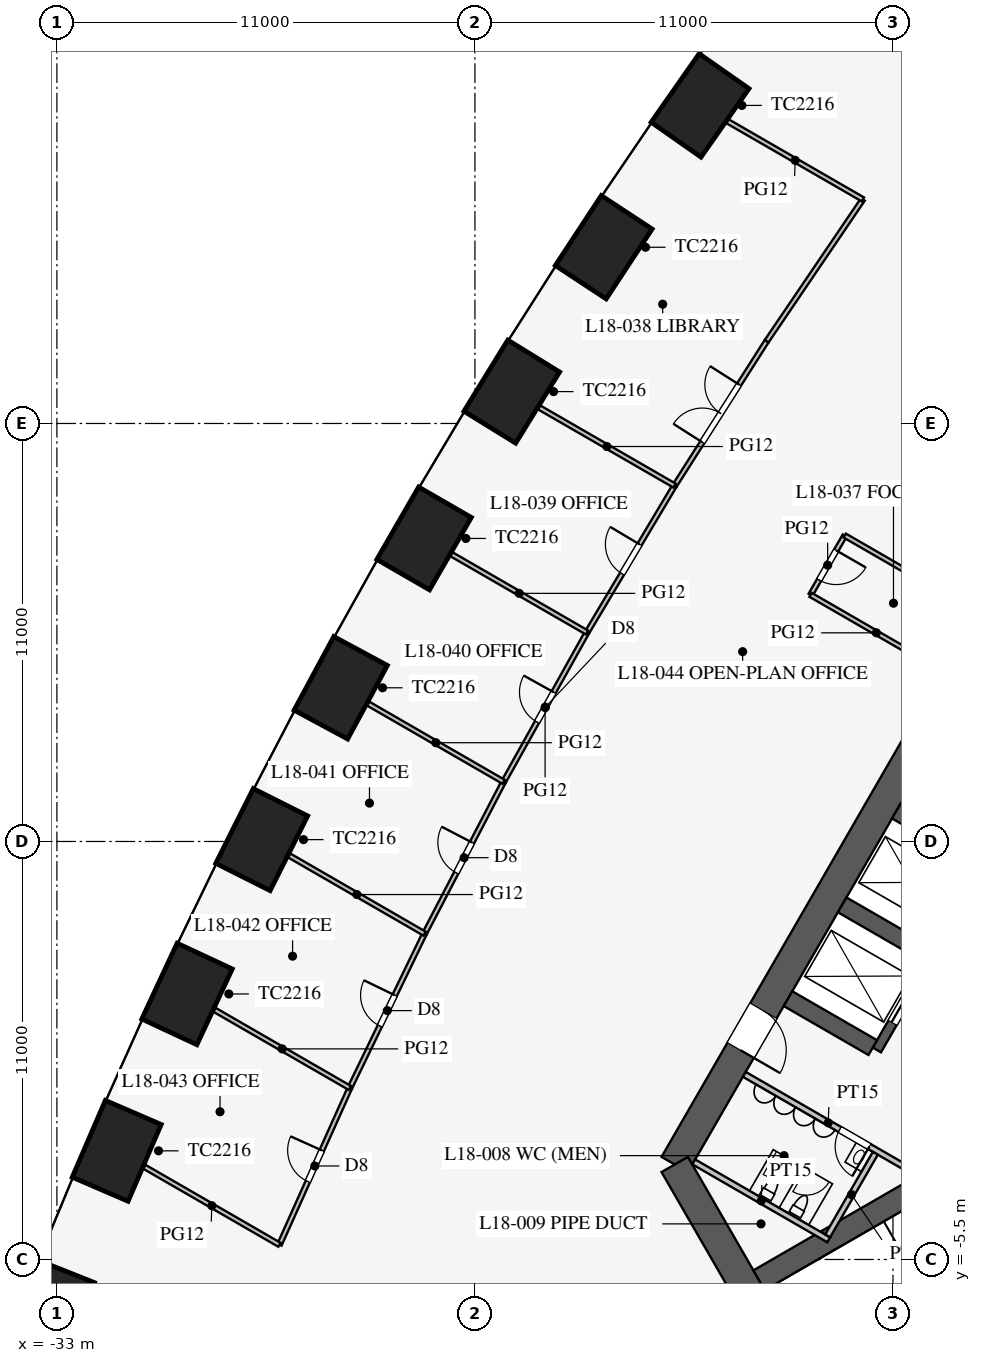
"""IFC4 building model, lengths in metres.
Left out: names, types, materials, properties, quantities, classifications, styles, units other than length and angle.
Written with IfcOpenShell. Run it as: python <this file> out.ifc"""

import sys

from ifc_helpers import new_model, si_unit, direction, frame, frame_2d, origin, origin_2d, place, context, subcontext, project, spatial, rectangle, extrude, element, fill, save


model = new_model("IFC4")
c1 = context("Model", 3, precision=1e-05, world=origin(), true_north=direction((0.0, 1.0)))
c2 = subcontext(c1, "Body", "Model", "MODEL_VIEW")
j1 = project(units=[si_unit("LENGTHUNIT", "METRE"), si_unit("PLANEANGLEUNIT", "RADIAN")], contexts=[c1])
p1 = place(None, origin())
s1 = spatial("IfcSite", under=j1, at=p1, CompositionType="ELEMENT")
p2 = place(p1, origin())
s2 = spatial("IfcBuilding", under=s1, at=p2, CompositionType="ELEMENT")
p3 = place(p2, frame((0.0, 0.0, 79.5)))
s3 = spatial("IfcBuildingStorey", under=s2, at=p3, CompositionType="ELEMENT", Elevation=79.5)
for number, where, z_axis, x_axis in (
    (1, (-16.076, 24.87, 0.0), (0.0, 0.0, 1.0), (-0.574, -0.819, 0.0)),
    (2, (-18.611, 21.137, 0.0), (0.0, 0.0, 1.0), (-0.549, -0.836, 0.0)),
    (3, (-21.031, 17.339, 0.0), (0.0, 0.0, 1.0), (-0.525, -0.851, 0.0)),
    (4, (-23.338, 13.474, 0.0), (0.0, 0.0, 1.0), (-0.5, -0.866, 0.0)),
    (5, (-25.531, 9.544, 0.0), (0.0, 0.0, 1.0), (-0.475, -0.88, 0.0)),
    (6, (-27.611, 5.549, 0.0), (0.0, 0.0, 1.0), (-0.449, -0.894, 0.0)),
    (7, (-29.576, 1.487, 0.0), (0.0, 0.0, 1.0), (-0.423, -0.906, 0.0)),
    (8, (-31.426, -2.641, 0.0), (0.0, 0.0, 1.0), (-0.396, -0.918, 0.0)),
    (9, (-33.16, -6.836, 0.0), (0.0, 0.0, 1.0), (-0.369, -0.929, 0.0)),
):
    element("IfcColumn", number, at=place(p3, frame(where, z_axis=z_axis, x_axis=x_axis)), inside=s3, PredefinedType="COLUMN", context=c2, shape_type="SweptSolid", body=[
        extrude(rectangle(XDim=2.2, YDim=1.6, at=origin_2d()), origin(), (0.0, 0.0, 1.0), 4.2),
    ])
p4 = place(p3, frame((-5.773, 16.0, 0.0), z_axis=(0.0, 0.0, 1.0), x_axis=(-0.500002442456, -0.866023993627, 0.0)))
e10 = element("IfcWall", 10, at=p4, inside=s3, PredefinedType="SHEAR", context=c2, shape_type="SweptSolid", body=[
    extrude(rectangle(XDim=21.939, YDim=0.8, at=frame_2d((10.97, 0.0))), origin(), (0.0, 0.0, 1.0), 4.2),
])
p5 = place(p4, frame((17.27, 0.0, 0.0)))
e11 = element("IfcOpeningElement", 11, at=p5, cuts=e10, PredefinedType="OPENING", context=c2, shape_type="SweptSolid", body=[
    extrude(rectangle(XDim=1.2, YDim=2.1, at=frame_2d((0.6, 1.05))), frame((0.0, 0.41, 0.0), z_axis=(0.0, -1.0, 0.0), x_axis=(1.0, 0.0, 0.0)), (0.0, 0.0, 1.0), 0.82),
])
p6 = place(p4, frame((3.47, 0.0, 0.0)))
e12 = element("IfcOpeningElement", 12, at=p6, cuts=e10, PredefinedType="OPENING", context=c2, shape_type="SweptSolid", body=[
    extrude(rectangle(XDim=1.2, YDim=2.1, at=frame_2d((0.6, 1.05))), frame((0.0, 0.41, 0.0), z_axis=(0.0, -1.0, 0.0), x_axis=(1.0, 0.0, 0.0)), (0.0, 0.0, 1.0), 0.82),
])
p7 = place(p3, frame((-16.743, -3.0, 0.0), z_axis=(0.0, 0.0, 1.0), x_axis=(0.499995765644, -0.866027848477, 0.0)))
e13 = element("IfcWall", 13, at=p7, inside=s3, PredefinedType="SHEAR", context=c2, shape_type="SweptSolid", body=[
    extrude(rectangle(XDim=11.547, YDim=0.8, at=frame_2d((5.773, 0.0))), origin(), (0.0, 0.0, 1.0), 4.2),
])
p8 = place(p3, frame((-5.724, 9.886, 0.0), z_axis=(0.0, 0.0, 1.0), x_axis=(-0.500001763848, -0.866024385424, 0.0)))
e14 = element("IfcWall", 14, at=p8, inside=s3, PredefinedType="SHEAR", context=c2, shape_type="SweptSolid", body=[
    extrude(rectangle(XDim=11.4, YDim=0.25, at=frame_2d((5.7, 0.0))), origin(), (0.0, 0.0, 1.0), 4.2),
])
p9 = place(p8, frame((6.525, 0.0, 0.0)))
e15 = element("IfcOpeningElement", 15, at=p9, cuts=e14, PredefinedType="OPENING", context=c2, shape_type="SweptSolid", body=[
    extrude(rectangle(XDim=1.2, YDim=2.2, at=frame_2d((0.6, 1.1))), frame((0.0, 0.135, 0.0), z_axis=(0.0, -1.0, 0.0), x_axis=(1.0, 0.0, 0.0)), (0.0, 0.0, 1.0), 0.27),
])
p10 = place(p8, frame((9.375, 0.0, 0.0)))
e16 = element("IfcOpeningElement", 16, at=p10, cuts=e14, PredefinedType="OPENING", context=c2, shape_type="SweptSolid", body=[
    extrude(rectangle(XDim=1.2, YDim=2.2, at=frame_2d((0.6, 1.1))), frame((0.0, 0.135, 0.0), z_axis=(0.0, -1.0, 0.0), x_axis=(1.0, 0.0, 0.0)), (0.0, 0.0, 1.0), 0.27),
])
for number, where, z_axis, x_axis in (
    (17, (-8.682, 5.012, 0.0), (0.0, 0.0, 1.0), (-0.866, 0.5, 0.0)),
    (18, (-10.107, 2.544, 0.0), (0.0, 0.0, 1.0), (-0.866, 0.5, 0.0)),
    (19, (-11.532, 0.076, 0.0), (0.0, 0.0, 1.0), (-0.866, 0.5, 0.0)),
):
    element("IfcWall", number, at=place(p3, frame(where, z_axis=z_axis, x_axis=x_axis)), inside=s3, PredefinedType="SHEAR", context=c2, shape_type="SweptSolid", body=[
        extrude(rectangle(XDim=2.575, YDim=0.45, at=frame_2d((1.288, 0.0))), origin(), (0.0, 0.0, 1.0), 4.2),
    ])
for number, where, z_axis, x_axis in (
    (20, (-6.663, -1.509, 0.0), (0.0, 0.0, 1.0), (-0.866, -0.5, 0.0)),
    (21, (-4.638, -5.016, 0.0), (0.0, 0.0, 1.0), (-0.866, -0.5, 0.0)),
):
    element("IfcWall", number, at=place(p3, frame(where, z_axis=z_axis, x_axis=x_axis)), inside=s3, PredefinedType="SHEAR", context=c2, shape_type="SweptSolid", body=[
        extrude(rectangle(XDim=9.075, YDim=0.6, at=frame_2d((4.538, 0.0))), origin(), (0.0, 0.0, 1.0), 4.2),
    ])
p11 = place(p3, frame((-10.495, -3.178, 0.0), z_axis=(0.0, 0.0, 1.0), x_axis=(-0.86602216432, 0.500005610874, 0.0)))
e22 = element("IfcWall", 22, at=p11, inside=s3, PredefinedType="PARTITIONING", context=c2, shape_type="SweptSolid", body=[
    extrude(rectangle(XDim=5.1, YDim=0.15, at=frame_2d((2.55, 0.0))), origin(), (0.0, 0.0, 1.0), 4.0),
])
p12 = place(p11, frame((1.3, 0.0, 0.0)))
e23 = element("IfcOpeningElement", 23, at=p12, cuts=e22, PredefinedType="OPENING", context=c2, shape_type="SweptSolid", body=[
    extrude(rectangle(XDim=0.9, YDim=2.1, at=frame_2d((0.45, 1.05))), frame((0.0, 0.085, 0.0), z_axis=(0.0, -1.0, 0.0), x_axis=(1.0, 0.0, 0.0)), (0.0, 0.0, 1.0), 0.17),
])
p13 = place(p3, frame((-12.691, -4.982, 0.0), z_axis=(0.0, 0.0, 1.0), x_axis=(-0.8660249478, 0.500000789788, 0.0)))
e24 = element("IfcWall", 24, at=p13, inside=s3, PredefinedType="PARTITIONING", context=c2, shape_type="SweptSolid", body=[
    extrude(rectangle(XDim=4.1, YDim=0.15, at=frame_2d((2.05, 0.0))), origin(), (0.0, 0.0, 1.0), 4.0),
])
p14 = place(p3, frame((-11.464, -2.706, 0.0), z_axis=(0.0, 0.0, 1.0), x_axis=(-0.50001992892, -0.866013897511, 0.0)))
e25 = element("IfcWall", 25, at=p14, inside=s3, PredefinedType="PARTITIONING", context=c2, shape_type="SweptSolid", body=[
    extrude(rectangle(XDim=2.51, YDim=0.15, at=frame_2d((1.255, 0.0))), origin(), (0.0, 0.0, 1.0), 4.0),
])
p15 = place(p3, frame((-12.269, 13.55, 0.0), z_axis=(0.0, 0.0, 1.0), x_axis=(-0.500062916607, -0.865989075817, 0.0)))
e26 = element("IfcWall", 26, at=p15, inside=s3, PredefinedType="PARTITIONING", context=c2, shape_type="SweptSolid", body=[
    extrude(rectangle(XDim=1.8, YDim=0.12, at=frame_2d((0.9, 0.0))), origin(), (0.0, 0.0, 1.0), 2.9),
])
p16 = place(p15, frame((0.45, 0.0, 0.15)))
e27 = element("IfcOpeningElement", 27, at=p16, cuts=e26, PredefinedType="OPENING", context=c2, shape_type="SweptSolid", body=[
    extrude(rectangle(XDim=0.9, YDim=2.1, at=frame_2d((0.45, 1.05))), frame((0.0, 0.07, 0.0), z_axis=(0.0, -1.0, 0.0), x_axis=(1.0, 0.0, 0.0)), (0.0, 0.0, 1.0), 0.14),
])
for number, where, z_axis, x_axis in (
    (28, (-9.705, 9.991, 0.0), (0.0, 0.0, 1.0), (-0.866, 0.5, 0.0)),
    (29, (-8.805, 11.55, 0.0), (0.0, 0.0, 1.0), (-0.866, 0.5, 0.0)),
):
    element("IfcWall", number, at=place(p3, frame(where, z_axis=z_axis, x_axis=x_axis)), inside=s3, PredefinedType="PARTITIONING", context=c2, shape_type="SweptSolid", body=[
        extrude(rectangle(XDim=4.0, YDim=0.12, at=frame_2d((2.0, 0.0))), origin(), (0.0, 0.0, 1.0), 2.9),
    ])
p17 = place(p3, frame((-19.052, 10.999, 0.0), z_axis=(0.0, 0.0, 1.0), x_axis=(-0.487373854787, -0.873193406795, 0.0)))
e30 = element("IfcWall", 30, at=p17, inside=s3, PredefinedType="PARTITIONING", context=c2, shape_type="SweptSolid", body=[
    extrude(rectangle(XDim=4.5, YDim=0.12, at=frame_2d((2.25, 0.0))), origin(), (0.0, 0.0, 1.0), 2.9),
])
p18 = place(p17, frame((1.8, 0.0, 0.15)))
e31 = element("IfcOpeningElement", 31, at=p18, cuts=e30, PredefinedType="OPENING", context=c2, shape_type="SweptSolid", body=[
    extrude(rectangle(XDim=0.9, YDim=2.1, at=frame_2d((0.45, 1.05))), frame((0.0, 0.07, 0.0), z_axis=(0.0, -1.0, 0.0), x_axis=(1.0, 0.0, 0.0)), (0.0, 0.0, 1.0), 0.14),
])
p19 = place(p3, frame((-25.292, -0.986, 0.0), z_axis=(0.0, 0.0, 1.0), x_axis=(-0.409451055745, -0.912332084796, 0.0)))
e32 = element("IfcWall", 32, at=p19, inside=s3, PredefinedType="PARTITIONING", context=c2, shape_type="SweptSolid", body=[
    extrude(rectangle(XDim=4.523, YDim=0.12, at=frame_2d((2.262, 0.0))), origin(), (0.0, 0.0, 1.0), 2.9),
])
p20 = place(p19, frame((1.8, 0.0, 0.15)))
e33 = element("IfcOpeningElement", 33, at=p20, cuts=e32, PredefinedType="OPENING", context=c2, shape_type="SweptSolid", body=[
    extrude(rectangle(XDim=0.9, YDim=2.1, at=frame_2d((0.45, 1.05))), frame((0.0, 0.07, 0.0), z_axis=(0.0, -1.0, 0.0), x_axis=(1.0, 0.0, 0.0)), (0.0, 0.0, 1.0), 0.14),
])
p21 = place(p3, frame((-21.245, 7.07, 0.0), z_axis=(0.0, 0.0, 1.0), x_axis=(-0.461852697957, -0.886956642339, 0.0)))
e34 = element("IfcWall", 34, at=p21, inside=s3, PredefinedType="PARTITIONING", context=c2, shape_type="SweptSolid", body=[
    extrude(rectangle(XDim=4.504, YDim=0.12, at=frame_2d((2.252, 0.0))), origin(), (0.0, 0.0, 1.0), 2.9),
])
p22 = place(p21, frame((1.8, 0.0, 0.15)))
e35 = element("IfcOpeningElement", 35, at=p22, cuts=e34, PredefinedType="OPENING", context=c2, shape_type="SweptSolid", body=[
    extrude(rectangle(XDim=0.9, YDim=2.1, at=frame_2d((0.45, 1.05))), frame((0.0, 0.07, 0.0), z_axis=(0.0, -1.0, 0.0), x_axis=(1.0, 0.0, 0.0)), (0.0, 0.0, 1.0), 0.14),
])
p23 = place(p3, frame((-23.325, 3.074, 0.0), z_axis=(0.0, 0.0, 1.0), x_axis=(-0.435857917556, -0.900015486369, 0.0)))
e36 = element("IfcWall", 36, at=p23, inside=s3, PredefinedType="PARTITIONING", context=c2, shape_type="SweptSolid", body=[
    extrude(rectangle(XDim=4.512, YDim=0.12, at=frame_2d((2.256, 0.0))), origin(), (0.0, 0.0, 1.0), 2.9),
])
p24 = place(p23, frame((1.8, 0.0, 0.15)))
e37 = element("IfcOpeningElement", 37, at=p24, cuts=e36, PredefinedType="OPENING", context=c2, shape_type="SweptSolid", body=[
    extrude(rectangle(XDim=0.9, YDim=2.1, at=frame_2d((0.45, 1.05))), frame((0.0, 0.07, 0.0), z_axis=(0.0, -1.0, 0.0), x_axis=(1.0, 0.0, 0.0)), (0.0, 0.0, 1.0), 0.14),
])
p25 = place(p3, frame((-11.792, 22.396, 0.0), z_axis=(0.0, 0.0, 1.0), x_axis=(-0.561512004239, -0.827468591002, 0.0)))
e38 = element("IfcWall", 38, at=p25, inside=s3, PredefinedType="PARTITIONING", context=c2, shape_type="SweptSolid", body=[
    extrude(rectangle(XDim=4.512, YDim=0.12, at=frame_2d((2.256, 0.0))), origin(), (0.0, 0.0, 1.0), 2.9),
])
p26 = place(p3, frame((-16.745, 14.864, 0.0), z_axis=(0.0, 0.0, 1.0), x_axis=(-0.51252396108, -0.858672923364, 0.0)))
e39 = element("IfcWall", 39, at=p26, inside=s3, PredefinedType="PARTITIONING", context=c2, shape_type="SweptSolid", body=[
    extrude(rectangle(XDim=4.5, YDim=0.12, at=frame_2d((2.25, 0.0))), origin(), (0.0, 0.0, 1.0), 2.9),
])
p27 = place(p26, frame((1.8, 0.0, 0.15)))
e40 = element("IfcOpeningElement", 40, at=p27, cuts=e39, PredefinedType="OPENING", context=c2, shape_type="SweptSolid", body=[
    extrude(rectangle(XDim=0.9, YDim=2.1, at=frame_2d((0.45, 1.05))), frame((0.0, 0.07, 0.0), z_axis=(0.0, -1.0, 0.0), x_axis=(1.0, 0.0, 0.0)), (0.0, 0.0, 1.0), 0.14),
])
p28 = place(p3, frame((-14.325, 18.663, 0.0), z_axis=(0.0, 0.0, 1.0), x_axis=(-0.537205132487, -0.843451626135, 0.0)))
e41 = element("IfcWall", 41, at=p28, inside=s3, PredefinedType="PARTITIONING", context=c2, shape_type="SweptSolid", body=[
    extrude(rectangle(XDim=4.504, YDim=0.12, at=frame_2d((2.252, 0.0))), origin(), (0.0, 0.0, 1.0), 2.9),
])
p29 = place(p28, frame((1.35, 0.0, 0.15)))
e42 = element("IfcOpeningElement", 42, at=p29, cuts=e41, PredefinedType="OPENING", context=c2, shape_type="SweptSolid", body=[
    extrude(rectangle(XDim=1.8, YDim=2.1, at=frame_2d((0.9, 1.05))), frame((0.0, 0.07, 0.0), z_axis=(0.0, -1.0, 0.0), x_axis=(1.0, 0.0, 0.0)), (0.0, 0.0, 1.0), 0.14),
])
p30 = place(p3, frame((-19.052, 10.999, 0.0), z_axis=(0.0, 0.0, 1.0), x_axis=(-0.866009926209, 0.50002680699, 0.0)))
e43 = element("IfcWall", 43, at=p30, inside=s3, PredefinedType="PARTITIONING", context=c2, shape_type="SweptSolid", body=[
    extrude(rectangle(XDim=4.12, YDim=0.12, at=frame_2d((2.06, 0.0))), origin(), (0.0, 0.0, 1.0), 2.8),
])
p31 = place(p3, frame((-25.292, -0.986, 0.0), z_axis=(0.0, 0.0, 1.0), x_axis=(-0.86601756884, 0.500013570277, 0.0)))
e44 = element("IfcWall", 44, at=p31, inside=s3, PredefinedType="PARTITIONING", context=c2, shape_type="SweptSolid", body=[
    extrude(rectangle(XDim=4.114, YDim=0.12, at=frame_2d((2.057, 0.0))), origin(), (0.0, 0.0, 1.0), 2.6),
])
p32 = place(p3, frame((-27.144, -5.113, 0.0), z_axis=(0.0, 0.0, 1.0), x_axis=(-0.866022320763, 0.500005339912, 0.0)))
e45 = element("IfcWall", 45, at=p32, inside=s3, PredefinedType="PARTITIONING", context=c2, shape_type="SweptSolid", body=[
    extrude(rectangle(XDim=4.109, YDim=0.12, at=frame_2d((2.054, 0.0))), origin(), (0.0, 0.0, 1.0), 2.6),
])
p33 = place(p3, frame((-21.245, 7.07, 0.0), z_axis=(0.0, 0.0, 1.0), x_axis=(-0.866031617834, 0.499989236795, 0.0)))
e46 = element("IfcWall", 46, at=p33, inside=s3, PredefinedType="PARTITIONING", context=c2, shape_type="SweptSolid", body=[
    extrude(rectangle(XDim=4.119, YDim=0.12, at=frame_2d((2.06, 0.0))), origin(), (0.0, 0.0, 1.0), 2.8),
])
p34 = place(p3, frame((-23.325, 3.074, 0.0), z_axis=(0.0, 0.0, 1.0), x_axis=(-0.866030556495, 0.499991075137, 0.0)))
e47 = element("IfcWall", 47, at=p34, inside=s3, PredefinedType="PARTITIONING", context=c2, shape_type="SweptSolid", body=[
    extrude(rectangle(XDim=4.117, YDim=0.12, at=frame_2d((2.059, 0.0))), origin(), (0.0, 0.0, 1.0), 2.8),
])
p35 = place(p3, frame((-11.792, 22.396, 0.0), z_axis=(0.0, 0.0, 1.0), x_axis=(-0.865991869213, 0.500058079084, 0.0)))
e48 = element("IfcWall", 48, at=p35, inside=s3, PredefinedType="PARTITIONING", context=c2, shape_type="SweptSolid", body=[
    extrude(rectangle(XDim=4.114, YDim=0.12, at=frame_2d((2.057, 0.0))), origin(), (0.0, 0.0, 1.0), 2.6),
])
p36 = place(p3, frame((-16.745, 14.864, 0.0), z_axis=(0.0, 0.0, 1.0), x_axis=(-0.8660059538, 0.500033686847, 0.0)))
e49 = element("IfcWall", 49, at=p36, inside=s3, PredefinedType="PARTITIONING", context=c2, shape_type="SweptSolid", body=[
    extrude(rectangle(XDim=4.119, YDim=0.12, at=frame_2d((2.06, 0.0))), origin(), (0.0, 0.0, 1.0), 2.8),
])
p37 = place(p12, origin())
e50 = element("IfcDoor", 50, at=p37, inside=s3, OperationType="SINGLE_SWING_LEFT", PredefinedType="DOOR", context=c2, shape_type="SweptSolid", body=[
    extrude(rectangle(XDim=0.9, YDim=2.1, at=frame_2d((0.45, 1.05))), frame((0.0, 0.025, 0.0), z_axis=(0.0, -1.0, 0.0), x_axis=(1.0, 0.0, 0.0)), (0.0, 0.0, 1.0), 0.05),
])
fill(e23, e50)
p38 = place(p5, origin())
e51 = element("IfcDoor", 51, at=p38, inside=s3, OperationType="SINGLE_SWING_RIGHT", PredefinedType="DOOR", context=c2, shape_type="SweptSolid", body=[
    extrude(rectangle(XDim=1.2, YDim=2.1, at=frame_2d((0.6, 1.05))), frame((0.0, 0.025, 0.0), z_axis=(0.0, -1.0, 0.0), x_axis=(1.0, 0.0, 0.0)), (0.0, 0.0, 1.0), 0.05),
])
fill(e11, e51)
p39 = place(p16, origin())
e52 = element("IfcDoor", 52, at=p39, inside=s3, OperationType="SINGLE_SWING_LEFT", PredefinedType="DOOR", context=c2, shape_type="SweptSolid", body=[
    extrude(rectangle(XDim=0.9, YDim=2.1, at=frame_2d((0.45, 1.05))), frame((0.0, 0.025, 0.0), z_axis=(0.0, -1.0, 0.0), x_axis=(1.0, 0.0, 0.0)), (0.0, 0.0, 1.0), 0.05),
])
fill(e27, e52)
p40 = place(p29, frame((1.8, 0.0, 0.0), z_axis=(0.0, 0.0, 1.0), x_axis=(-1.0, 0.0, 0.0)))
e53 = element("IfcDoor", 53, at=p40, inside=s3, OperationType="DOUBLE_DOOR_SINGLE_SWING", PredefinedType="DOOR", context=c2, shape_type="SweptSolid", body=[
    extrude(rectangle(XDim=1.8, YDim=2.1, at=frame_2d((0.9, 1.05))), frame((0.0, 0.025, 0.0), z_axis=(0.0, -1.0, 0.0), x_axis=(1.0, 0.0, 0.0)), (0.0, 0.0, 1.0), 0.05),
])
fill(e42, e53)
p41 = place(p27, frame((0.9, 0.0, 0.0), z_axis=(0.0, 0.0, 1.0), x_axis=(-1.0, 0.0, 0.0)))
e54 = element("IfcDoor", 54, at=p41, inside=s3, OperationType="SINGLE_SWING_RIGHT", PredefinedType="DOOR", context=c2, shape_type="SweptSolid", body=[
    extrude(rectangle(XDim=0.9, YDim=2.1, at=frame_2d((0.45, 1.05))), frame((0.0, 0.025, 0.0), z_axis=(0.0, -1.0, 0.0), x_axis=(1.0, 0.0, 0.0)), (0.0, 0.0, 1.0), 0.05),
])
fill(e40, e54)
p42 = place(p18, frame((0.9, 0.0, 0.0), z_axis=(0.0, 0.0, 1.0), x_axis=(-1.0, 0.0, 0.0)))
e55 = element("IfcDoor", 55, at=p42, inside=s3, OperationType="SINGLE_SWING_RIGHT", PredefinedType="DOOR", context=c2, shape_type="SweptSolid", body=[
    extrude(rectangle(XDim=0.9, YDim=2.1, at=frame_2d((0.45, 1.05))), frame((0.0, 0.025, 0.0), z_axis=(0.0, -1.0, 0.0), x_axis=(1.0, 0.0, 0.0)), (0.0, 0.0, 1.0), 0.05),
])
fill(e31, e55)
p43 = place(p22, frame((0.9, 0.0, 0.0), z_axis=(0.0, 0.0, 1.0), x_axis=(-1.0, 0.0, 0.0)))
e56 = element("IfcDoor", 56, at=p43, inside=s3, OperationType="SINGLE_SWING_RIGHT", PredefinedType="DOOR", context=c2, shape_type="SweptSolid", body=[
    extrude(rectangle(XDim=0.9, YDim=2.1, at=frame_2d((0.45, 1.05))), frame((0.0, 0.025, 0.0), z_axis=(0.0, -1.0, 0.0), x_axis=(1.0, 0.0, 0.0)), (0.0, 0.0, 1.0), 0.05),
])
fill(e35, e56)
p44 = place(p24, frame((0.9, 0.0, 0.0), z_axis=(0.0, 0.0, 1.0), x_axis=(-1.0, 0.0, 0.0)))
e57 = element("IfcDoor", 57, at=p44, inside=s3, OperationType="SINGLE_SWING_RIGHT", PredefinedType="DOOR", context=c2, shape_type="SweptSolid", body=[
    extrude(rectangle(XDim=0.9, YDim=2.1, at=frame_2d((0.45, 1.05))), frame((0.0, 0.025, 0.0), z_axis=(0.0, -1.0, 0.0), x_axis=(1.0, 0.0, 0.0)), (0.0, 0.0, 1.0), 0.05),
])
fill(e37, e57)
p45 = place(p20, frame((0.9, 0.0, 0.0), z_axis=(0.0, 0.0, 1.0), x_axis=(-1.0, 0.0, 0.0)))
e58 = element("IfcDoor", 58, at=p45, inside=s3, OperationType="SINGLE_SWING_RIGHT", PredefinedType="DOOR", context=c2, shape_type="SweptSolid", body=[
    extrude(rectangle(XDim=0.9, YDim=2.1, at=frame_2d((0.45, 1.05))), frame((0.0, 0.025, 0.0), z_axis=(0.0, -1.0, 0.0), x_axis=(1.0, 0.0, 0.0)), (0.0, 0.0, 1.0), 0.05),
])
fill(e33, e58)
p46 = place(p10, origin())
e59 = element("IfcDoor", 59, at=p46, inside=s3, OperationType="DOUBLE_DOOR_SLIDING", PredefinedType="DOOR", context=c2, shape_type="SweptSolid", body=[
    extrude(rectangle(XDim=1.2, YDim=2.2, at=frame_2d((0.6, 1.1))), frame((0.0, 0.025, 0.0), z_axis=(0.0, -1.0, 0.0), x_axis=(1.0, 0.0, 0.0)), (0.0, 0.0, 1.0), 0.05),
])
fill(e16, e59)
save(model, sys.argv[1])
